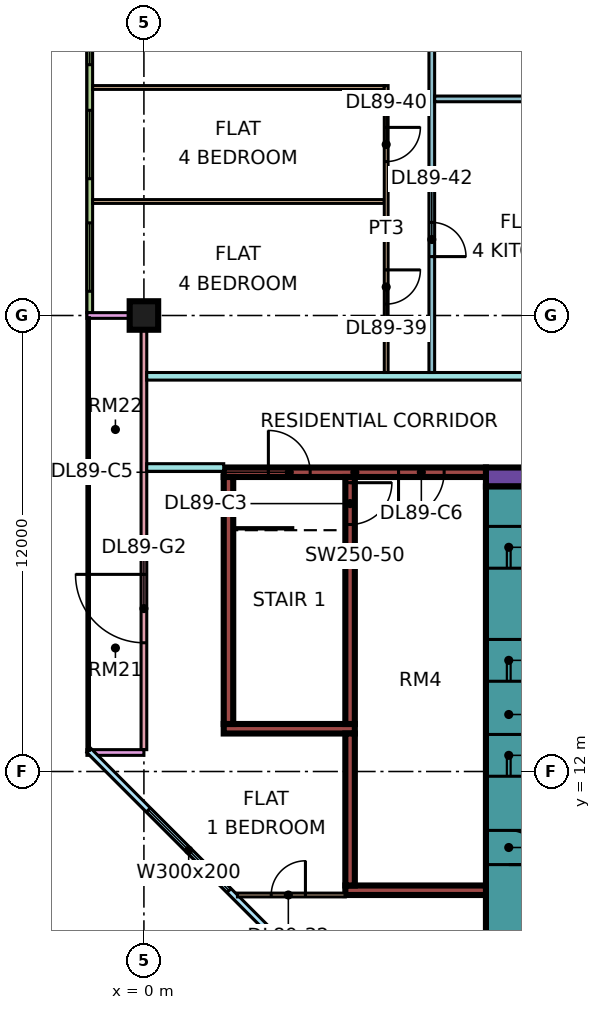
"""IFC4 building model, lengths in metres.
Left out: names, types, materials, properties, quantities, classifications, styles, units other than length and angle.
Written with IfcOpenShell. Run it as: python <this file> out.ifc"""

import sys

from ifc_helpers import new_model, si_unit, direction, frame, frame_2d, origin, origin_2d, place, context, subcontext, project, spatial, rectangle, extrude, element, fill, save


model = new_model("IFC4")
c1 = context("Model", 3, precision=1e-05, world=origin(), true_north=direction((0.0, 1.0)))
c2 = subcontext(c1, "Body", "Model", "MODEL_VIEW")
j1 = project(units=[si_unit("LENGTHUNIT", "METRE"), si_unit("PLANEANGLEUNIT", "RADIAN")], contexts=[c1])
p1 = place(None, origin())
s1 = spatial("IfcSite", under=j1, at=p1, CompositionType="ELEMENT")
p2 = place(p1, origin())
s2 = spatial("IfcBuilding", under=s1, at=p2, CompositionType="ELEMENT")
p3 = place(p2, frame((0.0, 0.0, 380.15)))
s3 = spatial("IfcBuildingStorey", under=s2, at=p3, CompositionType="ELEMENT", Elevation=380.15)
p4 = place(p3, frame((0.0, 24.0, 0.0), z_axis=(0.0, 0.0, 1.0), x_axis=(1.0, 0.0, 0.0)))
e1 = element("IfcColumn", 1, at=p4, inside=s3, PredefinedType="COLUMN", context=c2, shape_type="SweptSolid", body=[
    extrude(rectangle(XDim=0.75, YDim=0.75, at=origin_2d()), origin(), (0.0, 0.0, 1.0), 3.75),
])
p5 = place(p3, frame((9.0, 19.75, 0.0), z_axis=(0.0, 0.0, 1.0), x_axis=(1.0, 0.0, 0.0)))
e2 = element("IfcWall", 2, at=p5, inside=s3, PredefinedType="SHEAR", context=c2, shape_type="SweptSolid", body=[
    extrude(rectangle(XDim=25.0, YDim=0.5, at=frame_2d((12.5, 0.0))), origin(), (0.0, 0.0, 1.0), 3.75),
])
p6 = place(p5, frame((19.1, 0.0, 0.0)))
e3 = element("IfcOpeningElement", 3, at=p6, cuts=e2, PredefinedType="OPENING", context=c2, shape_type="SweptSolid", body=[
    extrude(rectangle(XDim=1.8, YDim=2.4, at=frame_2d((0.9, 1.2))), frame((0.0, 0.26, 0.0), z_axis=(0.0, -1.0, 0.0), x_axis=(1.0, 0.0, 0.0)), (0.0, 0.0, 1.0), 0.52),
])
p7 = place(p3, frame((9.6, 7.5, 0.0), z_axis=(0.0, 0.0, 1.0), x_axis=(0.0, 1.0, 0.0)))
e4 = element("IfcWall", 4, at=p7, inside=s3, PredefinedType="SHEAR", context=c2, shape_type="SweptSolid", body=[
    extrude(rectangle(XDim=12.0, YDim=1.2, at=frame_2d((6.0, 0.0))), origin(), (0.0, 0.0, 1.0), 3.75),
])
p8 = place(p7, frame((4.375, 0.0, 0.0)))
e5 = element("IfcOpeningElement", 5, at=p8, cuts=e4, PredefinedType="OPENING", context=c2, shape_type="SweptSolid", body=[
    extrude(rectangle(XDim=1.1, YDim=2.2, at=frame_2d((0.55, 1.1))), frame((0.0, 0.61, 0.0), z_axis=(0.0, -1.0, 0.0), x_axis=(1.0, 0.0, 0.0)), (0.0, 0.0, 1.0), 1.22),
])
p9 = place(p7, frame((6.875, 0.0, 0.0)))
e6 = element("IfcOpeningElement", 6, at=p9, cuts=e4, PredefinedType="OPENING", context=c2, shape_type="SweptSolid", body=[
    extrude(rectangle(XDim=1.1, YDim=2.2, at=frame_2d((0.55, 1.1))), frame((0.0, 0.61, 0.0), z_axis=(0.0, -1.0, 0.0), x_axis=(1.0, 0.0, 0.0)), (0.0, 0.0, 1.0), 1.22),
])
p10 = place(p7, frame((9.85, 0.0, 0.0)))
e7 = element("IfcOpeningElement", 7, at=p10, cuts=e4, PredefinedType="OPENING", context=c2, shape_type="SweptSolid", body=[
    extrude(rectangle(XDim=1.1, YDim=2.2, at=frame_2d((0.55, 1.1))), frame((0.0, 0.61, 0.0), z_axis=(0.0, -1.0, 0.0), x_axis=(1.0, 0.0, 0.0)), (0.0, 0.0, 1.0), 1.22),
])
p11 = place(p7, frame((2.05, 0.0, 0.0)))
e8 = element("IfcOpeningElement", 8, at=p11, cuts=e4, PredefinedType="OPENING", context=c2, shape_type="SweptSolid", body=[
    extrude(rectangle(XDim=0.9, YDim=2.1, at=frame_2d((0.45, 1.05))), frame((0.0, 0.61, 0.0), z_axis=(0.0, -1.0, 0.0), x_axis=(1.0, 0.0, 0.0)), (0.0, 0.0, 1.0), 1.22),
])
p12 = place(p3, frame((2.1, 19.875, 0.0), z_axis=(0.0, 0.0, 1.0), x_axis=(1.0, 0.0, 0.0)))
e9 = element("IfcWall", 9, at=p12, inside=s3, PredefinedType="SHEAR", context=c2, shape_type="SweptSolid", body=[
    extrude(rectangle(XDim=6.9, YDim=0.25, at=frame_2d((3.45, 0.0))), origin(), (0.0, 0.0, 1.0), 3.75),
])
p13 = place(p12, frame((1.175, 0.0, 0.0)))
e10 = element("IfcOpeningElement", 10, at=p13, cuts=e9, PredefinedType="OPENING", context=c2, shape_type="SweptSolid", body=[
    extrude(rectangle(XDim=1.1, YDim=2.2, at=frame_2d((0.55, 1.1))), frame((0.0, 0.135, 0.0), z_axis=(0.0, -1.0, 0.0), x_axis=(1.0, 0.0, 0.0)), (0.0, 0.0, 1.0), 0.27),
])
p14 = place(p12, frame((4.6, 0.0, 0.0)))
e11 = element("IfcOpeningElement", 11, at=p14, cuts=e9, PredefinedType="OPENING", context=c2, shape_type="SweptSolid", body=[
    extrude(rectangle(XDim=1.2, YDim=2.2, at=frame_2d((0.6, 1.1))), frame((0.0, 0.135, 0.0), z_axis=(0.0, -1.0, 0.0), x_axis=(1.0, 0.0, 0.0)), (0.0, 0.0, 1.0), 0.27),
])
p15 = place(p3, frame((2.1, 13.125, 0.0), z_axis=(0.0, 0.0, 1.0), x_axis=(1.0, 0.0, 0.0)))
e12 = element("IfcWall", 12, at=p15, inside=s3, PredefinedType="SHEAR", context=c2, shape_type="SweptSolid", body=[
    extrude(rectangle(XDim=3.45, YDim=0.25, at=frame_2d((1.725, 0.0))), origin(), (0.0, 0.0, 1.0), 3.75),
])
p16 = place(p3, frame((2.225, 13.25, 0.0), z_axis=(0.0, 0.0, 1.0), x_axis=(0.0, 1.0, 0.0)))
e13 = element("IfcWall", 13, at=p16, inside=s3, PredefinedType="SHEAR", context=c2, shape_type="SweptSolid", body=[
    extrude(rectangle(XDim=6.5, YDim=0.25, at=frame_2d((3.25, 0.0))), origin(), (0.0, 0.0, 1.0), 3.75),
])
p17 = place(p3, frame((5.425, 13.25, 0.0), z_axis=(0.0, 0.0, 1.0), x_axis=(0.0, 1.0, 0.0)))
e14 = element("IfcWall", 14, at=p17, inside=s3, PredefinedType="SHEAR", context=c2, shape_type="SweptSolid", body=[
    extrude(rectangle(XDim=6.5, YDim=0.25, at=frame_2d((3.25, 0.0))), origin(), (0.0, 0.0, 1.0), 3.75),
])
p18 = place(p17, frame((5.25, 0.0, 0.0)))
e15 = element("IfcOpeningElement", 15, at=p18, cuts=e14, PredefinedType="OPENING", context=c2, shape_type="SweptSolid", body=[
    extrude(rectangle(XDim=1.1, YDim=2.2, at=frame_2d((0.55, 1.1))), frame((0.0, 0.135, 0.0), z_axis=(0.0, -1.0, 0.0), x_axis=(1.0, 0.0, 0.0)), (0.0, 0.0, 1.0), 0.27),
])
p19 = place(p3, frame((5.3, 8.875, 0.0), z_axis=(0.0, 0.0, 1.0), x_axis=(1.0, 0.0, 0.0)))
e16 = element("IfcWall", 16, at=p19, inside=s3, PredefinedType="SHEAR", context=c2, shape_type="SweptSolid", body=[
    extrude(rectangle(XDim=3.7, YDim=0.25, at=frame_2d((1.85, 0.0))), origin(), (0.0, 0.0, 1.0), 3.75),
])
p20 = place(p3, frame((5.425, 9.0, 0.0), z_axis=(0.0, 0.0, 1.0), x_axis=(0.0, 1.0, 0.0)))
e17 = element("IfcWall", 17, at=p20, inside=s3, PredefinedType="SHEAR", context=c2, shape_type="SweptSolid", body=[
    extrude(rectangle(XDim=4.0, YDim=0.25, at=frame_2d((2.0, 0.0))), origin(), (0.0, 0.0, 1.0), 3.75),
])
p21 = place(p3, frame((-1.425, 35.925, 0.0), z_axis=(0.0, 0.0, 1.0), x_axis=(0.0, -1.0, 0.0)))
e18 = element("IfcWall", 18, at=p21, inside=s3, PredefinedType="SOLIDWALL", context=c2, shape_type="SweptSolid", body=[
    extrude(rectangle(XDim=11.85, YDim=0.15, at=frame_2d((5.925, 0.0))), origin(), (0.0, 0.0, 1.0), 3.3),
])
p22 = place(p21, frame((0.562, 0.0, 0.45)))
e19 = element("IfcOpeningElement", 19, at=p22, cuts=e18, PredefinedType="OPENING", context=c2, shape_type="SweptSolid", body=[
    extrude(rectangle(XDim=1.8, YDim=2.0, at=frame_2d((0.9, 1.0))), frame((0.0, 0.085, 0.0), z_axis=(0.0, -1.0, 0.0), x_axis=(1.0, 0.0, 0.0)), (0.0, 0.0, 1.0), 0.17),
])
p23 = place(p21, frame((3.525, 0.0, 0.45)))
e20 = element("IfcOpeningElement", 20, at=p23, cuts=e18, PredefinedType="OPENING", context=c2, shape_type="SweptSolid", body=[
    extrude(rectangle(XDim=1.8, YDim=2.0, at=frame_2d((0.9, 1.0))), frame((0.0, 0.085, 0.0), z_axis=(0.0, -1.0, 0.0), x_axis=(1.0, 0.0, 0.0)), (0.0, 0.0, 1.0), 0.17),
])
p24 = place(p21, frame((6.525, 0.0, 0.45)))
e21 = element("IfcOpeningElement", 21, at=p24, cuts=e18, PredefinedType="OPENING", context=c2, shape_type="SweptSolid", body=[
    extrude(rectangle(XDim=1.8, YDim=2.0, at=frame_2d((0.9, 1.0))), frame((0.0, 0.085, 0.0), z_axis=(0.0, -1.0, 0.0), x_axis=(1.0, 0.0, 0.0)), (0.0, 0.0, 1.0), 0.17),
])
p25 = place(p21, frame((9.488, 0.0, 0.45)))
e22 = element("IfcOpeningElement", 22, at=p25, cuts=e18, PredefinedType="OPENING", context=c2, shape_type="SweptSolid", body=[
    extrude(rectangle(XDim=1.8, YDim=2.0, at=frame_2d((0.9, 1.0))), frame((0.0, 0.085, 0.0), z_axis=(0.0, -1.0, 0.0), x_axis=(1.0, 0.0, 0.0)), (0.0, 0.0, 1.0), 0.17),
])
p26 = place(p3, frame((0.0, 23.925, 0.0), z_axis=(0.0, 0.0, 1.0), x_axis=(0.0, -1.0, 0.0)))
e23 = element("IfcWall", 23, at=p26, inside=s3, PredefinedType="SOLIDWALL", context=c2, shape_type="SweptSolid", body=[
    extrude(rectangle(XDim=11.35, YDim=0.15, at=frame_2d((5.675, 0.0))), origin(), (0.0, 0.0, 1.0), 3.3),
])
p27 = place(p26, frame((6.738, 0.0, 0.0)))
e24 = element("IfcOpeningElement", 24, at=p27, cuts=e23, PredefinedType="OPENING", context=c2, shape_type="SweptSolid", body=[
    extrude(rectangle(XDim=1.8, YDim=2.4, at=frame_2d((0.9, 1.2))), frame((0.0, 0.085, 0.0), z_axis=(0.0, -1.0, 0.0), x_axis=(1.0, 0.0, 0.0)), (0.0, 0.0, 1.0), 0.17),
])
for number, where, z_axis, x_axis in (
    (25, (-1.5, 24.0, 0.0), (0.0, 0.0, 1.0), (1.0, 0.0, 0.0)),
    (26, (-1.5, 12.5, 0.0), (0.0, 0.0, 1.0), (1.0, 0.0, 0.0)),
):
    element("IfcWall", number, at=place(p3, frame(where, z_axis=z_axis, x_axis=x_axis)), inside=s3, PredefinedType="SOLIDWALL", context=c2, shape_type="SweptSolid", body=[
        extrude(rectangle(XDim=1.5, YDim=0.15, at=frame_2d((0.75, 0.0))), origin(), (0.0, 0.0, 1.0), 3.3),
    ])
p28 = place(p3, frame((-1.447, 12.553, 0.0), z_axis=(0.0, 0.0, 1.0), x_axis=(0.707106781187, -0.707106781187, 0.0)))
e27 = element("IfcWall", 27, at=p28, inside=s3, PredefinedType="SOLIDWALL", context=c2, shape_type="SweptSolid", body=[
    extrude(rectangle(XDim=19.799, YDim=0.15, at=frame_2d((9.899, 0.0))), origin(), (0.0, 0.0, 1.0), 3.3),
])
p29 = place(p28, frame((2.212, 0.0, 0.45)))
e28 = element("IfcOpeningElement", 28, at=p29, cuts=e27, PredefinedType="OPENING", context=c2, shape_type="SweptSolid", body=[
    extrude(rectangle(XDim=3.0, YDim=2.0, at=frame_2d((1.5, 1.0))), frame((0.0, 0.085, 0.0), z_axis=(0.0, -1.0, 0.0), x_axis=(1.0, 0.0, 0.0)), (0.0, 0.0, 1.0), 0.17),
])
p30 = place(p28, frame((10.216, 0.0, 0.45)))
e29 = element("IfcOpeningElement", 29, at=p30, cuts=e27, PredefinedType="OPENING", context=c2, shape_type="SweptSolid", body=[
    extrude(rectangle(XDim=3.0, YDim=2.0, at=frame_2d((1.5, 1.0))), frame((0.0, 0.085, 0.0), z_axis=(0.0, -1.0, 0.0), x_axis=(1.0, 0.0, 0.0)), (0.0, 0.0, 1.0), 0.17),
])
p31 = place(p3, frame((-1.351, 27.0, 0.0), z_axis=(0.0, 0.0, 1.0), x_axis=(1.0, 0.0, 0.0)))
e30 = element("IfcWall", 30, at=p31, inside=s3, PredefinedType="PARTITIONING", context=c2, shape_type="SweptSolid", body=[
    extrude(rectangle(XDim=7.676, YDim=0.1, at=frame_2d((3.838, 0.0))), origin(), (0.0, 0.0, 1.0), 3.3),
])
p32 = place(p3, frame((-1.35, 30.0, 0.0), z_axis=(0.0, 0.0, 1.0), x_axis=(1.0, 0.0, 0.0)))
e31 = element("IfcWall", 31, at=p32, inside=s3, PredefinedType="PARTITIONING", context=c2, shape_type="SweptSolid", body=[
    extrude(rectangle(XDim=7.675, YDim=0.1, at=frame_2d((3.837, 0.0))), origin(), (0.0, 0.0, 1.0), 3.3),
])
p33 = place(p3, frame((0.074, 20.0, 0.0), z_axis=(0.0, 0.0, 1.0), x_axis=(1.0, 0.0, 0.0)))
e32 = element("IfcWall", 32, at=p33, inside=s3, PredefinedType="PARTITIONING", context=c2, shape_type="SweptSolid", body=[
    extrude(rectangle(XDim=2.026, YDim=0.2, at=frame_2d((1.013, 0.0))), origin(), (0.0, 0.0, 1.0), 3.3),
])
p34 = place(p3, frame((0.074, 22.4, 0.0), z_axis=(0.0, 0.0, 1.0), x_axis=(1.0, 0.0, 0.0)))
e33 = element("IfcWall", 33, at=p34, inside=s3, PredefinedType="PARTITIONING", context=c2, shape_type="SweptSolid", body=[
    extrude(rectangle(XDim=12.201, YDim=0.2, at=frame_2d((6.101, 0.0))), origin(), (0.0, 0.0, 1.0), 3.3),
])
p35 = place(p3, frame((2.461, 8.75, 0.0), z_axis=(0.0, 0.0, 1.0), x_axis=(1.0, 0.0, 0.0)))
e34 = element("IfcWall", 34, at=p35, inside=s3, PredefinedType="PARTITIONING", context=c2, shape_type="SweptSolid", body=[
    extrude(rectangle(XDim=2.839, YDim=0.1, at=frame_2d((1.419, 0.0))), origin(), (0.0, 0.0, 1.0), 3.3),
])
p36 = place(p35, frame((0.889, 0.0, 0.0)))
e35 = element("IfcOpeningElement", 35, at=p36, cuts=e34, PredefinedType="OPENING", context=c2, shape_type="SweptSolid", body=[
    extrude(rectangle(XDim=0.9, YDim=2.1, at=frame_2d((0.45, 1.05))), frame((0.0, 0.06, 0.0), z_axis=(0.0, -1.0, 0.0), x_axis=(1.0, 0.0, 0.0)), (0.0, 0.0, 1.0), 0.12),
])
p37 = place(p3, frame((6.375, 22.5, 0.0), z_axis=(0.0, 0.0, 1.0), x_axis=(0.0, 1.0, 0.0)))
e36 = element("IfcWall", 36, at=p37, inside=s3, PredefinedType="PARTITIONING", context=c2, shape_type="SweptSolid", body=[
    extrude(rectangle(XDim=7.55, YDim=0.1, at=frame_2d((3.775, 0.0))), origin(), (0.0, 0.0, 1.0), 3.3),
])
p38 = place(p37, frame((1.8, 0.0, 0.0)))
e37 = element("IfcOpeningElement", 37, at=p38, cuts=e36, PredefinedType="OPENING", context=c2, shape_type="SweptSolid", body=[
    extrude(rectangle(XDim=0.9, YDim=2.1, at=frame_2d((0.45, 1.05))), frame((0.0, 0.06, 0.0), z_axis=(0.0, -1.0, 0.0), x_axis=(1.0, 0.0, 0.0)), (0.0, 0.0, 1.0), 0.12),
])
p39 = place(p37, frame((5.55, 0.0, 0.0)))
e38 = element("IfcOpeningElement", 38, at=p39, cuts=e36, PredefinedType="OPENING", context=c2, shape_type="SweptSolid", body=[
    extrude(rectangle(XDim=0.9, YDim=2.1, at=frame_2d((0.45, 1.05))), frame((0.0, 0.06, 0.0), z_axis=(0.0, -1.0, 0.0), x_axis=(1.0, 0.0, 0.0)), (0.0, 0.0, 1.0), 0.12),
])
p40 = place(p3, frame((7.575, 22.5, 0.0), z_axis=(0.0, 0.0, 1.0), x_axis=(0.0, 1.0, 0.0)))
e39 = element("IfcWall", 39, at=p40, inside=s3, PredefinedType="PARTITIONING", context=c2, shape_type="SweptSolid", body=[
    extrude(rectangle(XDim=10.875, YDim=0.15, at=frame_2d((5.438, 0.0))), origin(), (0.0, 0.0, 1.0), 3.3),
])
p41 = place(p40, frame((8.55, 0.0, 0.0)))
e40 = element("IfcOpeningElement", 40, at=p41, cuts=e39, PredefinedType="OPENING", context=c2, shape_type="SweptSolid", body=[
    extrude(rectangle(XDim=0.8, YDim=2.1, at=frame_2d((0.4, 1.05))), frame((0.0, 0.085, 0.0), z_axis=(0.0, -1.0, 0.0), x_axis=(1.0, 0.0, 0.0)), (0.0, 0.0, 1.0), 0.17),
])
p42 = place(p40, frame((3.05, 0.0, 0.0)))
e41 = element("IfcOpeningElement", 41, at=p42, cuts=e39, PredefinedType="OPENING", context=c2, shape_type="SweptSolid", body=[
    extrude(rectangle(XDim=0.9, YDim=2.1, at=frame_2d((0.45, 1.05))), frame((0.0, 0.085, 0.0), z_axis=(0.0, -1.0, 0.0), x_axis=(1.0, 0.0, 0.0)), (0.0, 0.0, 1.0), 0.17),
])
p43 = place(p3, frame((7.65, 29.7, 0.0), z_axis=(0.0, 0.0, 1.0), x_axis=(1.0, 0.0, 0.0)))
e42 = element("IfcWall", 42, at=p43, inside=s3, PredefinedType="PARTITIONING", context=c2, shape_type="SweptSolid", body=[
    extrude(rectangle(XDim=4.625, YDim=0.15, at=frame_2d((2.312, 0.0))), origin(), (0.0, 0.0, 1.0), 3.3),
])
p44 = place(p23, origin())
e43 = element("IfcWindow", 43, at=p44, inside=s3, PartitioningType="SINGLE_PANEL", PredefinedType="WINDOW", context=c2, shape_type="SweptSolid", body=[
    extrude(rectangle(XDim=1.8, YDim=2.0, at=frame_2d((0.9, 1.0))), frame((0.0, 0.03, 0.0), z_axis=(0.0, -1.0, 0.0), x_axis=(1.0, 0.0, 0.0)), (0.0, 0.0, 1.0), 0.06),
])
fill(e20, e43)
p45 = place(p24, origin())
e44 = element("IfcWindow", 44, at=p45, inside=s3, PartitioningType="SINGLE_PANEL", PredefinedType="WINDOW", context=c2, shape_type="SweptSolid", body=[
    extrude(rectangle(XDim=1.8, YDim=2.0, at=frame_2d((0.9, 1.0))), frame((0.0, 0.03, 0.0), z_axis=(0.0, -1.0, 0.0), x_axis=(1.0, 0.0, 0.0)), (0.0, 0.0, 1.0), 0.06),
])
fill(e21, e44)
p46 = place(p25, origin())
e45 = element("IfcWindow", 45, at=p46, inside=s3, PartitioningType="SINGLE_PANEL", PredefinedType="WINDOW", context=c2, shape_type="SweptSolid", body=[
    extrude(rectangle(XDim=1.8, YDim=2.0, at=frame_2d((0.9, 1.0))), frame((0.0, 0.03, 0.0), z_axis=(0.0, -1.0, 0.0), x_axis=(1.0, 0.0, 0.0)), (0.0, 0.0, 1.0), 0.06),
])
fill(e22, e45)
p47 = place(p27, frame((1.8, 0.0, 0.0), z_axis=(0.0, 0.0, 1.0), x_axis=(-1.0, 0.0, 0.0)))
e46 = element("IfcDoor", 46, at=p47, inside=s3, OperationType="DOUBLE_DOOR_SINGLE_SWING", PredefinedType="DOOR", context=c2, shape_type="SweptSolid", body=[
    extrude(rectangle(XDim=1.8, YDim=2.4, at=frame_2d((0.9, 1.2))), frame((0.0, 0.025, 0.0), z_axis=(0.0, -1.0, 0.0), x_axis=(1.0, 0.0, 0.0)), (0.0, 0.0, 1.0), 0.05),
])
fill(e24, e46)
p48 = place(p29, origin())
e47 = element("IfcWindow", 47, at=p48, inside=s3, PartitioningType="SINGLE_PANEL", PredefinedType="WINDOW", context=c2, shape_type="SweptSolid", body=[
    extrude(rectangle(XDim=3.0, YDim=2.0, at=frame_2d((1.5, 1.0))), frame((0.0, 0.03, 0.0), z_axis=(0.0, -1.0, 0.0), x_axis=(1.0, 0.0, 0.0)), (0.0, 0.0, 1.0), 0.06),
])
fill(e28, e47)
p49 = place(p8, origin())
e48 = element("IfcDoor", 48, at=p49, inside=s3, OperationType="DOUBLE_DOOR_SLIDING", PredefinedType="DOOR", context=c2, shape_type="SweptSolid", body=[
    extrude(rectangle(XDim=1.1, YDim=2.2, at=frame_2d((0.55, 1.1))), frame((0.0, 0.025, 0.0), z_axis=(0.0, -1.0, 0.0), x_axis=(1.0, 0.0, 0.0)), (0.0, 0.0, 1.0), 0.05),
])
fill(e5, e48)
p50 = place(p9, origin())
e49 = element("IfcDoor", 49, at=p50, inside=s3, OperationType="DOUBLE_DOOR_SLIDING", PredefinedType="DOOR", context=c2, shape_type="SweptSolid", body=[
    extrude(rectangle(XDim=1.1, YDim=2.2, at=frame_2d((0.55, 1.1))), frame((0.0, 0.025, 0.0), z_axis=(0.0, -1.0, 0.0), x_axis=(1.0, 0.0, 0.0)), (0.0, 0.0, 1.0), 0.05),
])
fill(e6, e49)
p51 = place(p10, origin())
e50 = element("IfcDoor", 50, at=p51, inside=s3, OperationType="DOUBLE_DOOR_SLIDING", PredefinedType="DOOR", context=c2, shape_type="SweptSolid", body=[
    extrude(rectangle(XDim=1.1, YDim=2.2, at=frame_2d((0.55, 1.1))), frame((0.0, 0.025, 0.0), z_axis=(0.0, -1.0, 0.0), x_axis=(1.0, 0.0, 0.0)), (0.0, 0.0, 1.0), 0.05),
])
fill(e7, e50)
p52 = place(p18, origin())
e51 = element("IfcDoor", 51, at=p52, inside=s3, OperationType="SINGLE_SWING_RIGHT", PredefinedType="DOOR", context=c2, shape_type="SweptSolid", body=[
    extrude(rectangle(XDim=1.1, YDim=2.2, at=frame_2d((0.55, 1.1))), frame((0.0, 0.025, 0.0), z_axis=(0.0, -1.0, 0.0), x_axis=(1.0, 0.0, 0.0)), (0.0, 0.0, 1.0), 0.05),
])
fill(e15, e51)
p53 = place(p11, frame((0.9, 0.0, 0.0), z_axis=(0.0, 0.0, 1.0), x_axis=(-1.0, 0.0, 0.0)))
e52 = element("IfcDoor", 52, at=p53, inside=s3, OperationType="SINGLE_SWING_LEFT", PredefinedType="DOOR", context=c2, shape_type="SweptSolid", body=[
    extrude(rectangle(XDim=0.9, YDim=2.1, at=frame_2d((0.45, 1.05))), frame((0.0, 0.025, 0.0), z_axis=(0.0, -1.0, 0.0), x_axis=(1.0, 0.0, 0.0)), (0.0, 0.0, 1.0), 0.05),
])
fill(e8, e52)
p54 = place(p13, origin())
e53 = element("IfcDoor", 53, at=p54, inside=s3, OperationType="SINGLE_SWING_LEFT", PredefinedType="DOOR", context=c2, shape_type="SweptSolid", body=[
    extrude(rectangle(XDim=1.1, YDim=2.2, at=frame_2d((0.55, 1.1))), frame((0.0, 0.025, 0.0), z_axis=(0.0, -1.0, 0.0), x_axis=(1.0, 0.0, 0.0)), (0.0, 0.0, 1.0), 0.05),
])
fill(e10, e53)
p55 = place(p14, frame((1.2, 0.0, 0.0), z_axis=(0.0, 0.0, 1.0), x_axis=(-1.0, 0.0, 0.0)))
e54 = element("IfcDoor", 54, at=p55, inside=s3, OperationType="SINGLE_SWING_LEFT", PredefinedType="DOOR", context=c2, shape_type="SweptSolid", body=[
    extrude(rectangle(XDim=1.2, YDim=2.2, at=frame_2d((0.6, 1.1))), frame((0.0, 0.025, 0.0), z_axis=(0.0, -1.0, 0.0), x_axis=(1.0, 0.0, 0.0)), (0.0, 0.0, 1.0), 0.05),
])
fill(e11, e54)
p56 = place(p36, frame((0.9, 0.0, 0.0), z_axis=(0.0, 0.0, 1.0), x_axis=(-1.0, 0.0, 0.0)))
e55 = element("IfcDoor", 55, at=p56, inside=s3, OperationType="SINGLE_SWING_RIGHT", PredefinedType="DOOR", context=c2, shape_type="SweptSolid", body=[
    extrude(rectangle(XDim=0.9, YDim=2.1, at=frame_2d((0.45, 1.05))), frame((0.0, 0.025, 0.0), z_axis=(0.0, -1.0, 0.0), x_axis=(1.0, 0.0, 0.0)), (0.0, 0.0, 1.0), 0.05),
])
fill(e35, e55)
p57 = place(p38, origin())
e56 = element("IfcDoor", 56, at=p57, inside=s3, OperationType="SINGLE_SWING_RIGHT", PredefinedType="DOOR", context=c2, shape_type="SweptSolid", body=[
    extrude(rectangle(XDim=0.9, YDim=2.1, at=frame_2d((0.45, 1.05))), frame((0.0, 0.025, 0.0), z_axis=(0.0, -1.0, 0.0), x_axis=(1.0, 0.0, 0.0)), (0.0, 0.0, 1.0), 0.05),
])
fill(e37, e56)
p58 = place(p39, origin())
e57 = element("IfcDoor", 57, at=p58, inside=s3, OperationType="SINGLE_SWING_RIGHT", PredefinedType="DOOR", context=c2, shape_type="SweptSolid", body=[
    extrude(rectangle(XDim=0.9, YDim=2.1, at=frame_2d((0.45, 1.05))), frame((0.0, 0.025, 0.0), z_axis=(0.0, -1.0, 0.0), x_axis=(1.0, 0.0, 0.0)), (0.0, 0.0, 1.0), 0.05),
])
fill(e38, e57)
p59 = place(p42, frame((0.9, 0.0, 0.0), z_axis=(0.0, 0.0, 1.0), x_axis=(-1.0, 0.0, 0.0)))
e58 = element("IfcDoor", 58, at=p59, inside=s3, OperationType="SINGLE_SWING_LEFT", PredefinedType="DOOR", context=c2, shape_type="SweptSolid", body=[
    extrude(rectangle(XDim=0.9, YDim=2.1, at=frame_2d((0.45, 1.05))), frame((0.0, 0.025, 0.0), z_axis=(0.0, -1.0, 0.0), x_axis=(1.0, 0.0, 0.0)), (0.0, 0.0, 1.0), 0.05),
])
fill(e41, e58)
save(model, sys.argv[1])
